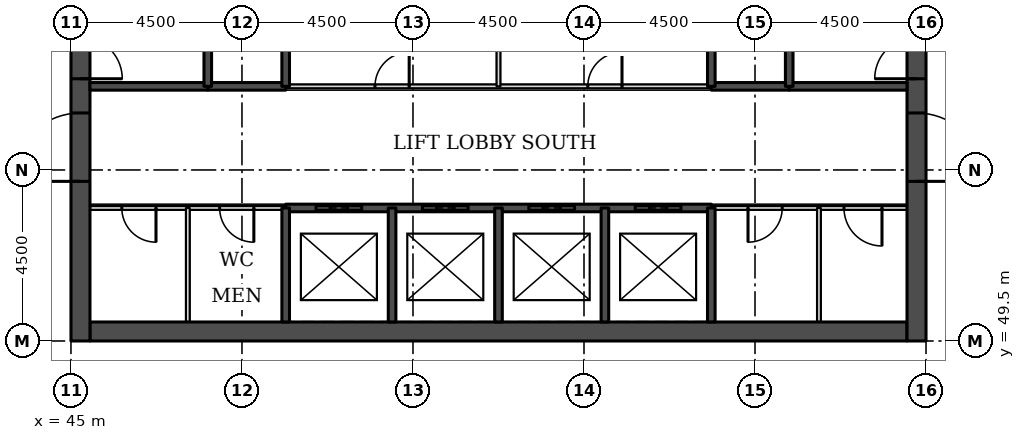
"""IFC4 building model, lengths in metres.
Left out: names, types, materials, properties, quantities, classifications, styles, units other than length and angle.
Written with IfcOpenShell. Run it as: python <this file> out.ifc"""

import sys

from ifc_helpers import new_model, si_unit, direction, frame, frame_2d, origin, place, context, subcontext, project, spatial, rectangle, extrude, element, fill, save


model = new_model("IFC4")
c1 = context("Model", 3, precision=1e-05, world=origin(), true_north=direction((0.0, 1.0)))
c2 = subcontext(c1, "Body", "Model", "MODEL_VIEW")
j1 = project(units=[si_unit("LENGTHUNIT", "METRE"), si_unit("PLANEANGLEUNIT", "RADIAN")], contexts=[c1])
p1 = place(None, origin())
s1 = spatial("IfcSite", under=j1, at=p1, CompositionType="ELEMENT")
p2 = place(p1, origin())
s2 = spatial("IfcBuilding", under=s1, at=p2, CompositionType="ELEMENT")
p3 = place(p2, frame((0.0, 0.0, -9.0)))
s3 = spatial("IfcBuildingStorey", under=s2, at=p3, CompositionType="ELEMENT", Elevation=-9.0)
p4 = place(p3, frame((45.5, 49.75, 0.0), z_axis=(0.0, 0.0, 1.0), x_axis=(1.0, 0.0, 0.0)))
e1 = element("IfcWall", 1, at=p4, inside=s3, PredefinedType="SHEAR", context=c2, shape_type="SweptSolid", body=[
    extrude(rectangle(XDim=21.5, YDim=0.5, at=frame_2d((10.75, 0.0))), origin(), (0.0, 0.0, 1.0), 4.5),
])
p5 = place(p3, frame((45.25, 49.5, 0.0), z_axis=(0.0, 0.0, 1.0), x_axis=(0.0, 1.0, 0.0)))
e2 = element("IfcWall", 2, at=p5, inside=s3, PredefinedType="SHEAR", context=c2, shape_type="SweptSolid", body=[
    extrude(rectangle(XDim=22.5, YDim=0.5, at=frame_2d((11.25, 0.0))), origin(), (0.0, 0.0, 1.0), 4.5),
])
p6 = place(p5, frame((4.2, 0.0, 0.0)))
e3 = element("IfcOpeningElement", 3, at=p6, cuts=e2, PredefinedType="OPENING", context=c2, shape_type="SweptSolid", body=[
    extrude(rectangle(XDim=1.8, YDim=2.1, at=frame_2d((0.9, 1.05))), frame((0.0, 0.26, 0.0), z_axis=(0.0, -1.0, 0.0), x_axis=(1.0, 0.0, 0.0)), (0.0, 0.0, 1.0), 0.52),
])
p7 = place(p5, frame((6.9, 0.0, 0.0)))
e4 = element("IfcOpeningElement", 4, at=p7, cuts=e2, PredefinedType="OPENING", context=c2, shape_type="SweptSolid", body=[
    extrude(rectangle(XDim=1.1, YDim=2.1, at=frame_2d((0.55, 1.05))), frame((0.0, 0.26, 0.0), z_axis=(0.0, -1.0, 0.0), x_axis=(1.0, 0.0, 0.0)), (0.0, 0.0, 1.0), 0.52),
])
p8 = place(p5, frame((13.6, 0.0, 0.0)))
e5 = element("IfcOpeningElement", 5, at=p8, cuts=e2, PredefinedType="OPENING", context=c2, shape_type="SweptSolid", body=[
    extrude(rectangle(XDim=1.1, YDim=2.1, at=frame_2d((0.55, 1.05))), frame((0.0, 0.26, 0.0), z_axis=(0.0, -1.0, 0.0), x_axis=(1.0, 0.0, 0.0)), (0.0, 0.0, 1.0), 0.52),
])
p9 = place(p5, frame((16.5, 0.0, 0.0)))
e6 = element("IfcOpeningElement", 6, at=p9, cuts=e2, PredefinedType="OPENING", context=c2, shape_type="SweptSolid", body=[
    extrude(rectangle(XDim=1.8, YDim=2.1, at=frame_2d((0.9, 1.05))), frame((0.0, 0.26, 0.0), z_axis=(0.0, -1.0, 0.0), x_axis=(1.0, 0.0, 0.0)), (0.0, 0.0, 1.0), 0.52),
])
p10 = place(p3, frame((67.25, 49.5, 0.0), z_axis=(0.0, 0.0, 1.0), x_axis=(0.0, 1.0, 0.0)))
e7 = element("IfcWall", 7, at=p10, inside=s3, PredefinedType="SHEAR", context=c2, shape_type="SweptSolid", body=[
    extrude(rectangle(XDim=22.5, YDim=0.5, at=frame_2d((11.25, 0.0))), origin(), (0.0, 0.0, 1.0), 4.5),
])
p11 = place(p10, frame((4.2, 0.0, 0.0)))
e8 = element("IfcOpeningElement", 8, at=p11, cuts=e7, PredefinedType="OPENING", context=c2, shape_type="SweptSolid", body=[
    extrude(rectangle(XDim=1.8, YDim=2.1, at=frame_2d((0.9, 1.05))), frame((0.0, 0.26, 0.0), z_axis=(0.0, -1.0, 0.0), x_axis=(1.0, 0.0, 0.0)), (0.0, 0.0, 1.0), 0.52),
])
p12 = place(p10, frame((6.9, 0.0, 0.0)))
e9 = element("IfcOpeningElement", 9, at=p12, cuts=e7, PredefinedType="OPENING", context=c2, shape_type="SweptSolid", body=[
    extrude(rectangle(XDim=1.1, YDim=2.1, at=frame_2d((0.55, 1.05))), frame((0.0, 0.26, 0.0), z_axis=(0.0, -1.0, 0.0), x_axis=(1.0, 0.0, 0.0)), (0.0, 0.0, 1.0), 0.52),
])
p13 = place(p10, frame((13.6, 0.0, 0.0)))
e10 = element("IfcOpeningElement", 10, at=p13, cuts=e7, PredefinedType="OPENING", context=c2, shape_type="SweptSolid", body=[
    extrude(rectangle(XDim=1.1, YDim=2.1, at=frame_2d((0.55, 1.05))), frame((0.0, 0.26, 0.0), z_axis=(0.0, -1.0, 0.0), x_axis=(1.0, 0.0, 0.0)), (0.0, 0.0, 1.0), 0.52),
])
p14 = place(p10, frame((16.5, 0.0, 0.0)))
e11 = element("IfcOpeningElement", 11, at=p14, cuts=e7, PredefinedType="OPENING", context=c2, shape_type="SweptSolid", body=[
    extrude(rectangle(XDim=1.8, YDim=2.1, at=frame_2d((0.9, 1.05))), frame((0.0, 0.26, 0.0), z_axis=(0.0, -1.0, 0.0), x_axis=(1.0, 0.0, 0.0)), (0.0, 0.0, 1.0), 0.52),
])
p15 = place(p3, frame((45.5, 53.0, 0.0), z_axis=(0.0, 0.0, 1.0), x_axis=(1.0, 0.0, 0.0)))
e12 = element("IfcWall", 12, at=p15, inside=s3, PredefinedType="PARTITIONING", context=c2, shape_type="SweptSolid", body=[
    extrude(rectangle(XDim=5.15, YDim=0.1, at=frame_2d((2.575, 0.0))), origin(), (0.0, 0.0, 1.0), 4.1),
])
p16 = place(p15, frame((0.837, 0.0, 0.0)))
e13 = element("IfcOpeningElement", 13, at=p16, cuts=e12, PredefinedType="OPENING", context=c2, shape_type="SweptSolid", body=[
    extrude(rectangle(XDim=0.9, YDim=2.1, at=frame_2d((0.45, 1.05))), frame((0.0, 0.06, 0.0), z_axis=(0.0, -1.0, 0.0), x_axis=(1.0, 0.0, 0.0)), (0.0, 0.0, 1.0), 0.12),
])
p17 = place(p15, frame((3.413, 0.0, 0.0)))
e14 = element("IfcOpeningElement", 14, at=p17, cuts=e12, PredefinedType="OPENING", context=c2, shape_type="SweptSolid", body=[
    extrude(rectangle(XDim=0.9, YDim=2.1, at=frame_2d((0.45, 1.05))), frame((0.0, 0.06, 0.0), z_axis=(0.0, -1.0, 0.0), x_axis=(1.0, 0.0, 0.0)), (0.0, 0.0, 1.0), 0.12),
])
p18 = place(p3, frame((61.85, 53.0, 0.0), z_axis=(0.0, 0.0, 1.0), x_axis=(1.0, 0.0, 0.0)))
e15 = element("IfcWall", 15, at=p18, inside=s3, PredefinedType="PARTITIONING", context=c2, shape_type="SweptSolid", body=[
    extrude(rectangle(XDim=5.15, YDim=0.1, at=frame_2d((2.575, 0.0))), origin(), (0.0, 0.0, 1.0), 4.1),
])
p19 = place(p18, frame((3.491, 0.0, 0.0)))
e16 = element("IfcOpeningElement", 16, at=p19, cuts=e15, PredefinedType="OPENING", context=c2, shape_type="SweptSolid", body=[
    extrude(rectangle(XDim=1.0, YDim=2.1, at=frame_2d((0.5, 1.05))), frame((0.0, 0.06, 0.0), z_axis=(0.0, -1.0, 0.0), x_axis=(1.0, 0.0, 0.0)), (0.0, 0.0, 1.0), 0.12),
])
p20 = place(p18, frame((0.966, 0.0, 0.0)))
e17 = element("IfcOpeningElement", 17, at=p20, cuts=e15, PredefinedType="OPENING", context=c2, shape_type="SweptSolid", body=[
    extrude(rectangle(XDim=0.9, YDim=2.1, at=frame_2d((0.45, 1.05))), frame((0.0, 0.06, 0.0), z_axis=(0.0, -1.0, 0.0), x_axis=(1.0, 0.0, 0.0)), (0.0, 0.0, 1.0), 0.12),
])
p21 = place(p3, frame((50.65, 53.0, 0.0), z_axis=(0.0, 0.0, 1.0), x_axis=(1.0, 0.0, 0.0)))
e18 = element("IfcWall", 18, at=p21, inside=s3, PredefinedType="SOLIDWALL", context=c2, shape_type="SweptSolid", body=[
    extrude(rectangle(XDim=11.2, YDim=0.2, at=frame_2d((5.6, 0.0))), origin(), (0.0, 0.0, 1.0), 4.1),
])
p22 = place(p21, frame((0.8, 0.0, 0.0)))
e19 = element("IfcOpeningElement", 19, at=p22, cuts=e18, PredefinedType="OPENING", context=c2, shape_type="SweptSolid", body=[
    extrude(rectangle(XDim=1.2, YDim=2.1, at=frame_2d((0.6, 1.05))), frame((0.0, 0.11, 0.0), z_axis=(0.0, -1.0, 0.0), x_axis=(1.0, 0.0, 0.0)), (0.0, 0.0, 1.0), 0.22),
])
p23 = place(p21, frame((3.6, 0.0, 0.0)))
e20 = element("IfcOpeningElement", 20, at=p23, cuts=e18, PredefinedType="OPENING", context=c2, shape_type="SweptSolid", body=[
    extrude(rectangle(XDim=1.2, YDim=2.1, at=frame_2d((0.6, 1.05))), frame((0.0, 0.11, 0.0), z_axis=(0.0, -1.0, 0.0), x_axis=(1.0, 0.0, 0.0)), (0.0, 0.0, 1.0), 0.22),
])
p24 = place(p21, frame((6.4, 0.0, 0.0)))
e21 = element("IfcOpeningElement", 21, at=p24, cuts=e18, PredefinedType="OPENING", context=c2, shape_type="SweptSolid", body=[
    extrude(rectangle(XDim=1.2, YDim=2.1, at=frame_2d((0.6, 1.05))), frame((0.0, 0.11, 0.0), z_axis=(0.0, -1.0, 0.0), x_axis=(1.0, 0.0, 0.0)), (0.0, 0.0, 1.0), 0.22),
])
p25 = place(p21, frame((9.2, 0.0, 0.0)))
e22 = element("IfcOpeningElement", 22, at=p25, cuts=e18, PredefinedType="OPENING", context=c2, shape_type="SweptSolid", body=[
    extrude(rectangle(XDim=1.2, YDim=2.1, at=frame_2d((0.6, 1.05))), frame((0.0, 0.11, 0.0), z_axis=(0.0, -1.0, 0.0), x_axis=(1.0, 0.0, 0.0)), (0.0, 0.0, 1.0), 0.22),
])
p26 = place(p3, frame((50.65, 56.2, 0.0), z_axis=(0.0, 0.0, 1.0), x_axis=(1.0, 0.0, 0.0)))
e23 = element("IfcWall", 23, at=p26, inside=s3, PredefinedType="PARTITIONING", context=c2, shape_type="SweptSolid", body=[
    extrude(rectangle(XDim=11.2, YDim=0.1, at=frame_2d((5.6, 0.0))), origin(), (0.0, 0.0, 1.0), 4.1),
])
p27 = place(p26, frame((2.35, 0.0, 0.0)))
e24 = element("IfcOpeningElement", 24, at=p27, cuts=e23, PredefinedType="OPENING", context=c2, shape_type="SweptSolid", body=[
    extrude(rectangle(XDim=0.9, YDim=2.1, at=frame_2d((0.45, 1.05))), frame((0.0, 0.06, 0.0), z_axis=(0.0, -1.0, 0.0), x_axis=(1.0, 0.0, 0.0)), (0.0, 0.0, 1.0), 0.12),
])
p28 = place(p26, frame((7.95, 0.0, 0.0)))
e25 = element("IfcOpeningElement", 25, at=p28, cuts=e23, PredefinedType="OPENING", context=c2, shape_type="SweptSolid", body=[
    extrude(rectangle(XDim=0.9, YDim=2.1, at=frame_2d((0.45, 1.05))), frame((0.0, 0.06, 0.0), z_axis=(0.0, -1.0, 0.0), x_axis=(1.0, 0.0, 0.0)), (0.0, 0.0, 1.0), 0.12),
])
for number, where, z_axis, x_axis in (
    (26, (48.6, 56.2, 0.0), (0.0, 0.0, 1.0), (1.0, 0.0, 0.0)),
    (27, (61.85, 56.2, 0.0), (0.0, 0.0, 1.0), (1.0, 0.0, 0.0)),
):
    element("IfcWall", number, at=place(p3, frame(where, z_axis=z_axis, x_axis=x_axis)), inside=s3, PredefinedType="SOLIDWALL", context=c2, shape_type="SweptSolid", body=[
        extrude(rectangle(XDim=2.05, YDim=0.2, at=frame_2d((1.025, 0.0))), origin(), (0.0, 0.0, 1.0), 4.1),
    ])
for number, where, z_axis, x_axis in (
    (28, (45.5, 56.2, 0.0), (0.0, 0.0, 1.0), (1.0, 0.0, 0.0)),
    (29, (63.9, 56.2, 0.0), (0.0, 0.0, 1.0), (1.0, 0.0, 0.0)),
):
    element("IfcWall", number, at=place(p3, frame(where, z_axis=z_axis, x_axis=x_axis)), inside=s3, PredefinedType="SOLIDWALL", context=c2, shape_type="SweptSolid", body=[
        extrude(rectangle(XDim=3.1, YDim=0.2, at=frame_2d((1.55, 0.0))), origin(), (0.0, 0.0, 1.0), 4.1),
    ])
p29 = place(p3, frame((48.075, 50.0, 0.0), z_axis=(0.0, 0.0, 1.0), x_axis=(0.0, 1.0, 0.0)))
e30 = element("IfcWall", 30, at=p29, inside=s3, PredefinedType="PARTITIONING", context=c2, shape_type="SweptSolid", body=[
    extrude(rectangle(XDim=3.0, YDim=0.1, at=frame_2d((1.5, 0.0))), origin(), (0.0, 0.0, 1.0), 4.1),
])
for number, where, z_axis, x_axis in (
    (31, (48.6, 56.2, 0.0), (0.0, 0.0, 1.0), (0.0, 1.0, 0.0)),
    (32, (50.65, 56.2, 0.0), (0.0, 0.0, 1.0), (0.0, 1.0, 0.0)),
):
    element("IfcWall", number, at=place(p3, frame(where, z_axis=z_axis, x_axis=x_axis)), inside=s3, PredefinedType="SOLIDWALL", context=c2, shape_type="SweptSolid", body=[
        extrude(rectangle(XDim=5.8, YDim=0.2, at=frame_2d((2.9, 0.0))), origin(), (0.0, 0.0, 1.0), 4.1),
    ])
for number, where, z_axis, x_axis in (
    (33, (50.65, 50.0, 0.0), (0.0, 0.0, 1.0), (0.0, 1.0, 0.0)),
    (34, (53.45, 50.0, 0.0), (0.0, 0.0, 1.0), (0.0, 1.0, 0.0)),
):
    element("IfcWall", number, at=place(p3, frame(where, z_axis=z_axis, x_axis=x_axis)), inside=s3, PredefinedType="SOLIDWALL", context=c2, shape_type="SweptSolid", body=[
        extrude(rectangle(XDim=3.0, YDim=0.2, at=frame_2d((1.5, 0.0))), origin(), (0.0, 0.0, 1.0), 4.1),
    ])
p30 = place(p3, frame((56.25, 56.2, 0.0), z_axis=(0.0, 0.0, 1.0), x_axis=(0.0, 1.0, 0.0)))
e35 = element("IfcWall", 35, at=p30, inside=s3, PredefinedType="PARTITIONING", context=c2, shape_type="SweptSolid", body=[
    extrude(rectangle(XDim=2.8, YDim=0.1, at=frame_2d((1.4, 0.0))), origin(), (0.0, 0.0, 1.0), 4.1),
])
for number, where, z_axis, x_axis in (
    (36, (56.25, 50.0, 0.0), (0.0, 0.0, 1.0), (0.0, 1.0, 0.0)),
    (37, (59.05, 50.0, 0.0), (0.0, 0.0, 1.0), (0.0, 1.0, 0.0)),
):
    element("IfcWall", number, at=place(p3, frame(where, z_axis=z_axis, x_axis=x_axis)), inside=s3, PredefinedType="SOLIDWALL", context=c2, shape_type="SweptSolid", body=[
        extrude(rectangle(XDim=3.0, YDim=0.2, at=frame_2d((1.5, 0.0))), origin(), (0.0, 0.0, 1.0), 4.1),
    ])
p31 = place(p3, frame((61.85, 56.2, 0.0), z_axis=(0.0, 0.0, 1.0), x_axis=(0.0, 1.0, 0.0)))
e38 = element("IfcWall", 38, at=p31, inside=s3, PredefinedType="SOLIDWALL", context=c2, shape_type="SweptSolid", body=[
    extrude(rectangle(XDim=5.8, YDim=0.2, at=frame_2d((2.9, 0.0))), origin(), (0.0, 0.0, 1.0), 4.1),
])
p32 = place(p3, frame((61.85, 50.0, 0.0), z_axis=(0.0, 0.0, 1.0), x_axis=(0.0, 1.0, 0.0)))
e39 = element("IfcWall", 39, at=p32, inside=s3, PredefinedType="SOLIDWALL", context=c2, shape_type="SweptSolid", body=[
    extrude(rectangle(XDim=3.0, YDim=0.2, at=frame_2d((1.5, 0.0))), origin(), (0.0, 0.0, 1.0), 4.1),
])
p33 = place(p3, frame((63.9, 56.2, 0.0), z_axis=(0.0, 0.0, 1.0), x_axis=(0.0, 1.0, 0.0)))
e40 = element("IfcWall", 40, at=p33, inside=s3, PredefinedType="SOLIDWALL", context=c2, shape_type="SweptSolid", body=[
    extrude(rectangle(XDim=5.8, YDim=0.2, at=frame_2d((2.9, 0.0))), origin(), (0.0, 0.0, 1.0), 4.1),
])
p34 = place(p3, frame((64.683, 50.0, 0.0), z_axis=(0.0, 0.0, 1.0), x_axis=(0.0, 1.0, 0.0)))
e41 = element("IfcWall", 41, at=p34, inside=s3, PredefinedType="PARTITIONING", context=c2, shape_type="SweptSolid", body=[
    extrude(rectangle(XDim=3.0, YDim=0.1, at=frame_2d((1.5, 0.0))), origin(), (0.0, 0.0, 1.0), 4.1),
])
p35 = place(p22, origin())
e42 = element("IfcDoor", 42, at=p35, inside=s3, OperationType="DOUBLE_DOOR_SLIDING", PredefinedType="DOOR", context=c2, shape_type="SweptSolid", body=[
    extrude(rectangle(XDim=1.2, YDim=2.1, at=frame_2d((0.6, 1.05))), frame((0.0, 0.025, 0.0), z_axis=(0.0, -1.0, 0.0), x_axis=(1.0, 0.0, 0.0)), (0.0, 0.0, 1.0), 0.05),
])
fill(e19, e42)
p36 = place(p23, origin())
e43 = element("IfcDoor", 43, at=p36, inside=s3, OperationType="DOUBLE_DOOR_SLIDING", PredefinedType="DOOR", context=c2, shape_type="SweptSolid", body=[
    extrude(rectangle(XDim=1.2, YDim=2.1, at=frame_2d((0.6, 1.05))), frame((0.0, 0.025, 0.0), z_axis=(0.0, -1.0, 0.0), x_axis=(1.0, 0.0, 0.0)), (0.0, 0.0, 1.0), 0.05),
])
fill(e20, e43)
p37 = place(p24, origin())
e44 = element("IfcDoor", 44, at=p37, inside=s3, OperationType="DOUBLE_DOOR_SLIDING", PredefinedType="DOOR", context=c2, shape_type="SweptSolid", body=[
    extrude(rectangle(XDim=1.2, YDim=2.1, at=frame_2d((0.6, 1.05))), frame((0.0, 0.025, 0.0), z_axis=(0.0, -1.0, 0.0), x_axis=(1.0, 0.0, 0.0)), (0.0, 0.0, 1.0), 0.05),
])
fill(e21, e44)
p38 = place(p25, origin())
e45 = element("IfcDoor", 45, at=p38, inside=s3, OperationType="DOUBLE_DOOR_SLIDING", PredefinedType="DOOR", context=c2, shape_type="SweptSolid", body=[
    extrude(rectangle(XDim=1.2, YDim=2.1, at=frame_2d((0.6, 1.05))), frame((0.0, 0.025, 0.0), z_axis=(0.0, -1.0, 0.0), x_axis=(1.0, 0.0, 0.0)), (0.0, 0.0, 1.0), 0.05),
])
fill(e22, e45)
p39 = place(p6, origin())
e46 = element("IfcDoor", 46, at=p39, inside=s3, OperationType="SINGLE_SWING_LEFT", PredefinedType="DOOR", context=c2, shape_type="SweptSolid", body=[
    extrude(rectangle(XDim=1.8, YDim=2.1, at=frame_2d((0.9, 1.05))), frame((0.0, 0.025, 0.0), z_axis=(0.0, -1.0, 0.0), x_axis=(1.0, 0.0, 0.0)), (0.0, 0.0, 1.0), 0.05),
])
fill(e3, e46)
p40 = place(p7, frame((1.1, 0.0, 0.0), z_axis=(0.0, 0.0, 1.0), x_axis=(-1.0, 0.0, 0.0)))
e47 = element("IfcDoor", 47, at=p40, inside=s3, OperationType="SINGLE_SWING_RIGHT", PredefinedType="DOOR", context=c2, shape_type="SweptSolid", body=[
    extrude(rectangle(XDim=1.1, YDim=2.1, at=frame_2d((0.55, 1.05))), frame((0.0, 0.025, 0.0), z_axis=(0.0, -1.0, 0.0), x_axis=(1.0, 0.0, 0.0)), (0.0, 0.0, 1.0), 0.05),
])
fill(e4, e47)
p41 = place(p11, frame((1.8, 0.0, 0.0), z_axis=(0.0, 0.0, 1.0), x_axis=(-1.0, 0.0, 0.0)))
e48 = element("IfcDoor", 48, at=p41, inside=s3, OperationType="SINGLE_SWING_RIGHT", PredefinedType="DOOR", context=c2, shape_type="SweptSolid", body=[
    extrude(rectangle(XDim=1.8, YDim=2.1, at=frame_2d((0.9, 1.05))), frame((0.0, 0.025, 0.0), z_axis=(0.0, -1.0, 0.0), x_axis=(1.0, 0.0, 0.0)), (0.0, 0.0, 1.0), 0.05),
])
fill(e8, e48)
p42 = place(p12, origin())
e49 = element("IfcDoor", 49, at=p42, inside=s3, OperationType="SINGLE_SWING_LEFT", PredefinedType="DOOR", context=c2, shape_type="SweptSolid", body=[
    extrude(rectangle(XDim=1.1, YDim=2.1, at=frame_2d((0.55, 1.05))), frame((0.0, 0.025, 0.0), z_axis=(0.0, -1.0, 0.0), x_axis=(1.0, 0.0, 0.0)), (0.0, 0.0, 1.0), 0.05),
])
fill(e9, e49)
p43 = place(p19, frame((1.0, 0.0, 0.0), z_axis=(0.0, 0.0, 1.0), x_axis=(-1.0, 0.0, 0.0)))
e50 = element("IfcDoor", 50, at=p43, inside=s3, OperationType="SINGLE_SWING_LEFT", PredefinedType="DOOR", context=c2, shape_type="SweptSolid", body=[
    extrude(rectangle(XDim=1.0, YDim=2.1, at=frame_2d((0.5, 1.05))), frame((0.0, 0.025, 0.0), z_axis=(0.0, -1.0, 0.0), x_axis=(1.0, 0.0, 0.0)), (0.0, 0.0, 1.0), 0.05),
])
fill(e16, e50)
p44 = place(p20, frame((0.9, 0.0, 0.0), z_axis=(0.0, 0.0, 1.0), x_axis=(-1.0, 0.0, 0.0)))
e51 = element("IfcDoor", 51, at=p44, inside=s3, OperationType="SINGLE_SWING_RIGHT", PredefinedType="DOOR", context=c2, shape_type="SweptSolid", body=[
    extrude(rectangle(XDim=0.9, YDim=2.1, at=frame_2d((0.45, 1.05))), frame((0.0, 0.025, 0.0), z_axis=(0.0, -1.0, 0.0), x_axis=(1.0, 0.0, 0.0)), (0.0, 0.0, 1.0), 0.05),
])
fill(e17, e51)
p45 = place(p16, frame((0.9, 0.0, 0.0), z_axis=(0.0, 0.0, 1.0), x_axis=(-1.0, 0.0, 0.0)))
e52 = element("IfcDoor", 52, at=p45, inside=s3, OperationType="SINGLE_SWING_LEFT", PredefinedType="DOOR", context=c2, shape_type="SweptSolid", body=[
    extrude(rectangle(XDim=0.9, YDim=2.1, at=frame_2d((0.45, 1.05))), frame((0.0, 0.025, 0.0), z_axis=(0.0, -1.0, 0.0), x_axis=(1.0, 0.0, 0.0)), (0.0, 0.0, 1.0), 0.05),
])
fill(e13, e52)
p46 = place(p17, frame((0.9, 0.0, 0.0), z_axis=(0.0, 0.0, 1.0), x_axis=(-1.0, 0.0, 0.0)))
e53 = element("IfcDoor", 53, at=p46, inside=s3, OperationType="SINGLE_SWING_LEFT", PredefinedType="DOOR", context=c2, shape_type="SweptSolid", body=[
    extrude(rectangle(XDim=0.9, YDim=2.1, at=frame_2d((0.45, 1.05))), frame((0.0, 0.025, 0.0), z_axis=(0.0, -1.0, 0.0), x_axis=(1.0, 0.0, 0.0)), (0.0, 0.0, 1.0), 0.05),
])
fill(e14, e53)
p47 = place(p27, origin())
e54 = element("IfcDoor", 54, at=p47, inside=s3, OperationType="SINGLE_SWING_RIGHT", PredefinedType="DOOR", context=c2, shape_type="SweptSolid", body=[
    extrude(rectangle(XDim=0.9, YDim=2.1, at=frame_2d((0.45, 1.05))), frame((0.0, 0.025, 0.0), z_axis=(0.0, -1.0, 0.0), x_axis=(1.0, 0.0, 0.0)), (0.0, 0.0, 1.0), 0.05),
])
fill(e24, e54)
p48 = place(p28, origin())
e55 = element("IfcDoor", 55, at=p48, inside=s3, OperationType="SINGLE_SWING_RIGHT", PredefinedType="DOOR", context=c2, shape_type="SweptSolid", body=[
    extrude(rectangle(XDim=0.9, YDim=2.1, at=frame_2d((0.45, 1.05))), frame((0.0, 0.025, 0.0), z_axis=(0.0, -1.0, 0.0), x_axis=(1.0, 0.0, 0.0)), (0.0, 0.0, 1.0), 0.05),
])
fill(e25, e55)
save(model, sys.argv[1])
